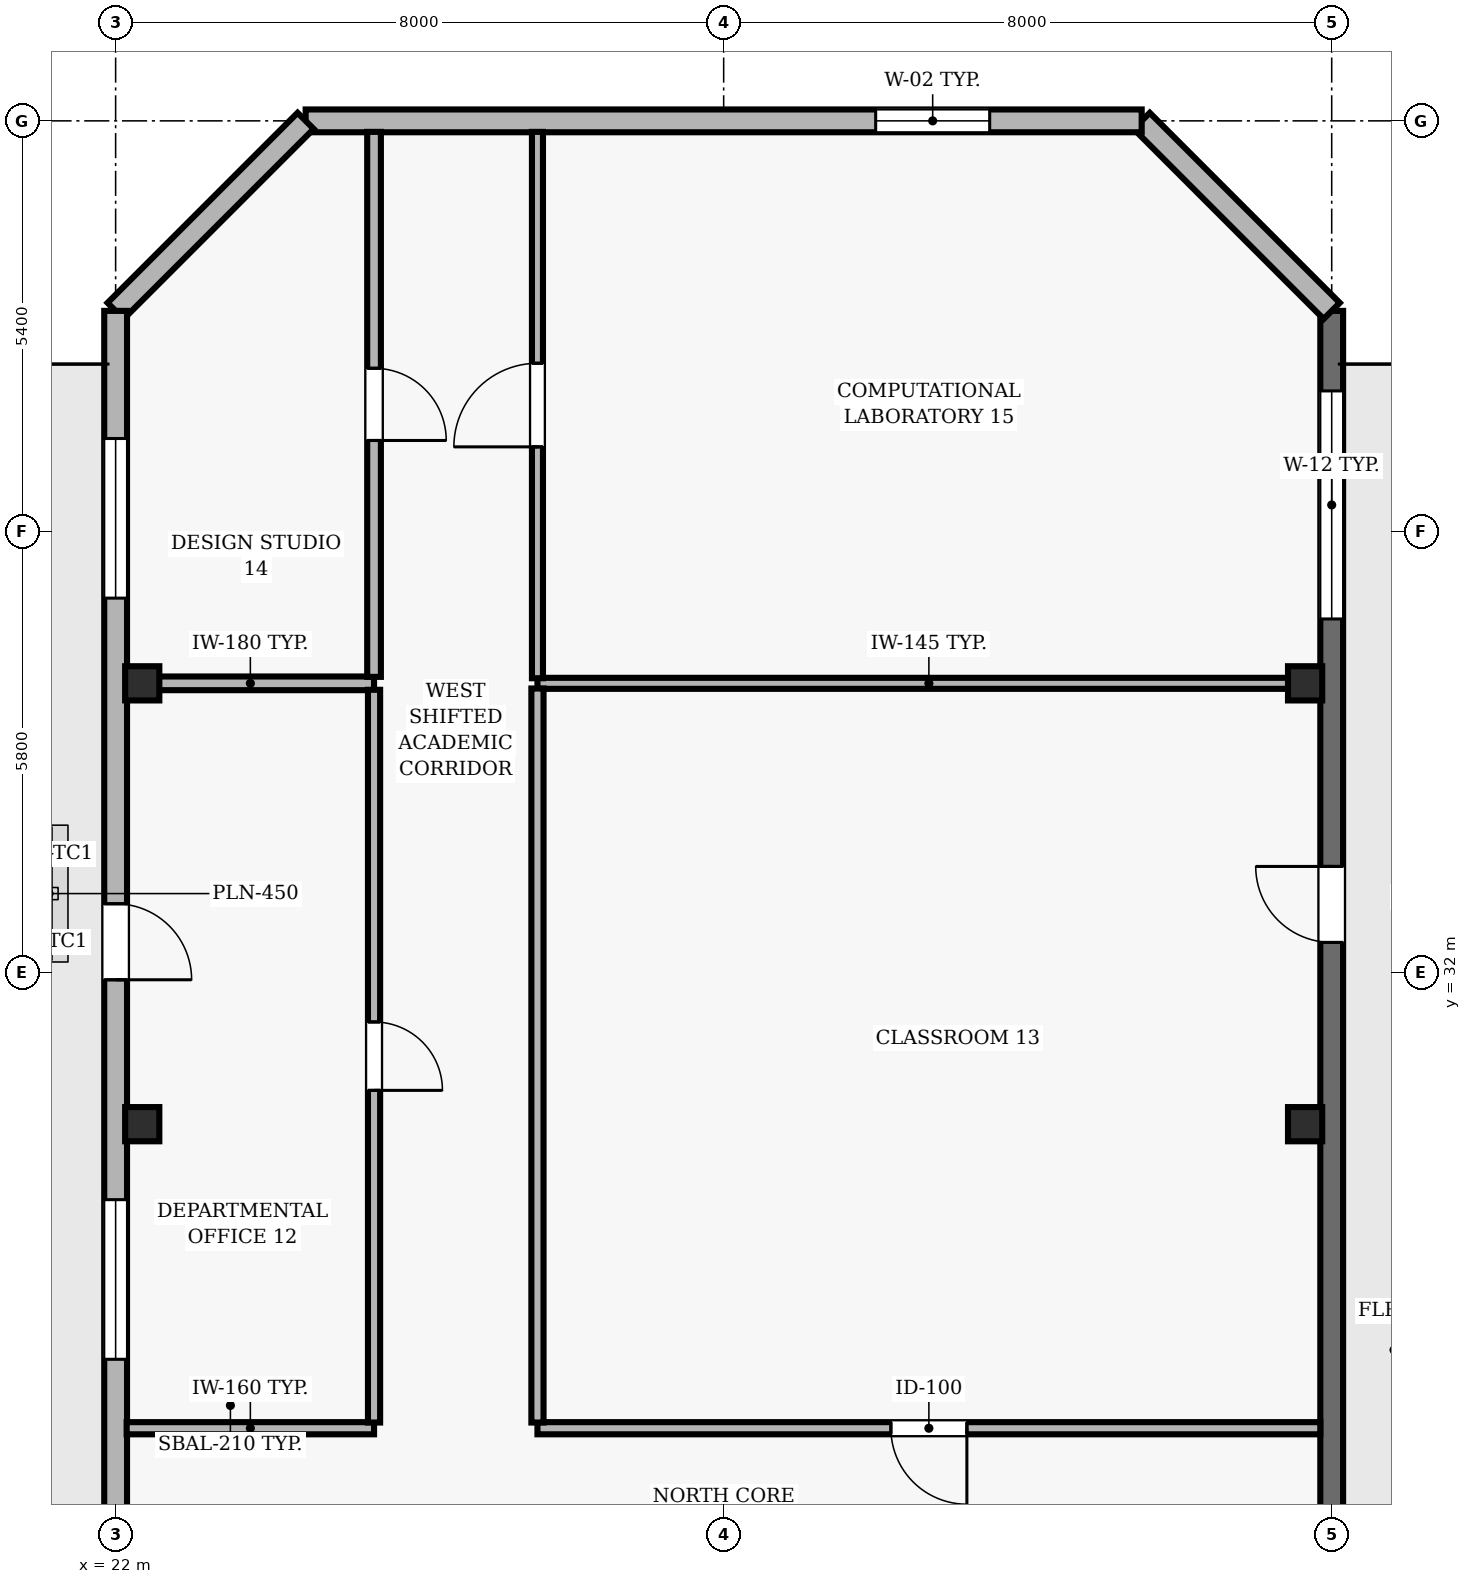
"""IFC4 building model, lengths in metres.
Left out: names, types, materials, properties, quantities, classifications, styles, units other than length and angle.
Written with IfcOpenShell. Run it as: python <this file> out.ifc"""

import sys

from ifc_helpers import new_model, si_unit, direction, frame, frame_2d, origin, origin_2d, place, context, subcontext, project, spatial, rectangle, hollow_rectangle, extrude, element, fill, save


model = new_model("IFC4")
c1 = context("Model", 3, precision=1e-05, world=origin(), true_north=direction((0.0, 1.0)))
c2 = subcontext(c1, "Body", "Model", "MODEL_VIEW")
j1 = project(units=[si_unit("LENGTHUNIT", "METRE"), si_unit("PLANEANGLEUNIT", "RADIAN")], contexts=[c1])
p1 = place(None, origin())
s1 = spatial("IfcSite", under=j1, at=p1, CompositionType="ELEMENT")
p2 = place(p1, origin())
s2 = spatial("IfcBuilding", under=s1, at=p2, CompositionType="ELEMENT")
p3 = place(p2, frame((0.0, 0.0, 210.9)))
s3 = spatial("IfcBuildingStorey", under=s2, at=p3, CompositionType="ELEMENT", Elevation=210.9)
for number, where, z_axis, x_axis in (
    (1, (22.35, 30.0, 0.0), (0.0, 0.0, 1.0), (1.0, 0.0, 0.0)),
    (2, (37.65, 30.0, 0.0), (0.0, 0.0, 1.0), (1.0, 0.0, 0.0)),
    (3, (22.35, 35.8, 0.0), (0.0, 0.0, 1.0), (1.0, 0.0, 0.0)),
    (4, (37.65, 35.8, 0.0), (0.0, 0.0, 1.0), (1.0, 0.0, 0.0)),
):
    element("IfcColumn", number, at=place(p3, frame(where, z_axis=z_axis, x_axis=x_axis)), inside=s3, PredefinedType="COLUMN", context=c2, shape_type="SweptSolid", body=[
        extrude(hollow_rectangle(XDim=0.45, YDim=0.45, WallThickness=0.02, at=origin_2d()), origin(), (0.0, 0.0, 1.0), 3.9),
    ])
p4 = place(p3, frame((38.0, 22.683, 0.0), z_axis=(0.0, 0.0, 1.0), x_axis=(0.0, 1.0, 0.0)))
e5 = element("IfcWall", 5, at=p4, inside=s3, PredefinedType="SOLIDWALL", context=c2, shape_type="SweptSolid", body=[
    extrude(rectangle(XDim=18.017, YDim=0.3, at=frame_2d((9.008, 0.0))), origin(), (0.0, 0.0, 1.0), 3.69),
])
p5 = place(p4, frame((9.708, 0.0, 0.0)))
e6 = element("IfcOpeningElement", 6, at=p5, cuts=e5, PredefinedType="OPENING", context=c2, shape_type="SweptSolid", body=[
    extrude(rectangle(XDim=1.0, YDim=2.2, at=frame_2d((0.5, 1.1))), frame((0.0, 0.16, 0.0), z_axis=(0.0, -1.0, 0.0), x_axis=(1.0, 0.0, 0.0)), (0.0, 0.0, 1.0), 0.32),
])
p6 = place(p4, frame((13.964, 0.0, 0.9)))
e7 = element("IfcOpeningElement", 7, at=p6, cuts=e5, PredefinedType="OPENING", context=c2, shape_type="SweptSolid", body=[
    extrude(rectangle(XDim=3.0, YDim=2.2, at=frame_2d((1.5, 1.1))), frame((0.0, 0.16, 0.0), z_axis=(0.0, -1.0, 0.0), x_axis=(1.0, 0.0, 0.0)), (0.0, 0.0, 1.0), 0.32),
])
p7 = place(p3, frame((38.0, 40.7, 0.0), z_axis=(0.0, 0.0, 1.0), x_axis=(-0.707106781187, 0.707106781187, 0.0)))
e8 = element("IfcWall", 8, at=p7, inside=s3, PredefinedType="SOLIDWALL", context=c2, shape_type="SweptSolid", body=[
    extrude(rectangle(XDim=3.536, YDim=0.3, at=frame_2d((1.768, 0.0))), origin(), (0.0, 0.0, 1.0), 3.69),
])
p8 = place(p3, frame((35.5, 43.2, 0.0), z_axis=(0.0, 0.0, 1.0), x_axis=(-1.0, 0.0, 0.0)))
e9 = element("IfcWall", 9, at=p8, inside=s3, PredefinedType="SOLIDWALL", context=c2, shape_type="SweptSolid", body=[
    extrude(rectangle(XDim=11.0, YDim=0.3, at=frame_2d((5.5, 0.0))), origin(), (0.0, 0.0, 1.0), 3.69),
])
p9 = place(p8, frame((2.0, 0.0, 0.9)))
e10 = element("IfcOpeningElement", 10, at=p9, cuts=e9, PredefinedType="OPENING", context=c2, shape_type="SweptSolid", body=[
    extrude(rectangle(XDim=1.5, YDim=1.6, at=frame_2d((0.75, 0.8))), frame((0.0, 0.16, 0.0), z_axis=(0.0, -1.0, 0.0), x_axis=(1.0, 0.0, 0.0)), (0.0, 0.0, 1.0), 0.32),
])
p10 = place(p3, frame((24.5, 43.2, 0.0), z_axis=(0.0, 0.0, 1.0), x_axis=(-0.707106781187, -0.707106781187, 0.0)))
e11 = element("IfcWall", 11, at=p10, inside=s3, PredefinedType="SOLIDWALL", context=c2, shape_type="SweptSolid", body=[
    extrude(rectangle(XDim=3.536, YDim=0.3, at=frame_2d((1.768, 0.0))), origin(), (0.0, 0.0, 1.0), 3.69),
])
p11 = place(p3, frame((22.0, 40.7, 0.0), z_axis=(0.0, 0.0, 1.0), x_axis=(0.0, -1.0, 0.0)))
e12 = element("IfcWall", 12, at=p11, inside=s3, PredefinedType="SOLIDWALL", context=c2, shape_type="SweptSolid", body=[
    extrude(rectangle(XDim=38.2, YDim=0.3, at=frame_2d((19.1, 0.0))), origin(), (0.0, 0.0, 1.0), 3.69),
])
p12 = place(p11, frame((7.8, 0.0, 0.0)))
e13 = element("IfcOpeningElement", 13, at=p12, cuts=e12, PredefinedType="OPENING", context=c2, shape_type="SweptSolid", body=[
    extrude(rectangle(XDim=1.0, YDim=2.2, at=frame_2d((0.5, 1.1))), frame((0.0, 0.16, 0.0), z_axis=(0.0, -1.0, 0.0), x_axis=(1.0, 0.0, 0.0)), (0.0, 0.0, 1.0), 0.32),
])
p13 = place(p11, frame((1.679, 0.0, 0.9)))
e14 = element("IfcOpeningElement", 14, at=p13, cuts=e12, PredefinedType="OPENING", context=c2, shape_type="SweptSolid", body=[
    extrude(rectangle(XDim=2.1, YDim=1.6, at=frame_2d((1.05, 0.8))), frame((0.0, 0.16, 0.0), z_axis=(0.0, -1.0, 0.0), x_axis=(1.0, 0.0, 0.0)), (0.0, 0.0, 1.0), 0.32),
])
p14 = place(p11, frame((11.693, 0.0, 0.9)))
e15 = element("IfcOpeningElement", 15, at=p14, cuts=e12, PredefinedType="OPENING", context=c2, shape_type="SweptSolid", body=[
    extrude(rectangle(XDim=2.1, YDim=1.6, at=frame_2d((1.05, 0.8))), frame((0.0, 0.16, 0.0), z_axis=(0.0, -1.0, 0.0), x_axis=(1.0, 0.0, 0.0)), (0.0, 0.0, 1.0), 0.32),
])
p15 = place(p11, frame((18.05, 0.0, 0.9)))
e16 = element("IfcOpeningElement", 16, at=p15, cuts=e12, PredefinedType="OPENING", context=c2, shape_type="SweptSolid", body=[
    extrude(rectangle(XDim=2.1, YDim=1.6, at=frame_2d((1.05, 0.8))), frame((0.0, 0.16, 0.0), z_axis=(0.0, -1.0, 0.0), x_axis=(1.0, 0.0, 0.0)), (0.0, 0.0, 1.0), 0.32),
])
p16 = place(p11, frame((23.057, 0.0, 0.9)))
e17 = element("IfcOpeningElement", 17, at=p16, cuts=e12, PredefinedType="OPENING", context=c2, shape_type="SweptSolid", body=[
    extrude(rectangle(XDim=2.1, YDim=1.6, at=frame_2d((1.05, 0.8))), frame((0.0, 0.16, 0.0), z_axis=(0.0, -1.0, 0.0), x_axis=(1.0, 0.0, 0.0)), (0.0, 0.0, 1.0), 0.32),
])
p17 = place(p11, frame((28.964, 0.0, 0.9)))
e18 = element("IfcOpeningElement", 18, at=p17, cuts=e12, PredefinedType="OPENING", context=c2, shape_type="SweptSolid", body=[
    extrude(rectangle(XDim=2.1, YDim=1.6, at=frame_2d((1.05, 0.8))), frame((0.0, 0.16, 0.0), z_axis=(0.0, -1.0, 0.0), x_axis=(1.0, 0.0, 0.0)), (0.0, 0.0, 1.0), 0.32),
])
p18 = place(p3, frame((25.4, 26.0, 0.0), z_axis=(0.0, 0.0, 1.0), x_axis=(-1.0, 0.0, 0.0)))
e19 = element("IfcWall", 19, at=p18, inside=s3, PredefinedType="PARTITIONING", context=c2, shape_type="SweptSolid", body=[
    extrude(rectangle(XDim=3.255, YDim=0.16, at=frame_2d((1.627, 0.0))), origin(), (0.0, 0.0, 1.0), 3.69),
])
p19 = place(p3, frame((25.4, 35.8, 0.0), z_axis=(0.0, 0.0, 1.0), x_axis=(-1.0, 0.0, 0.0)))
e20 = element("IfcWall", 20, at=p19, inside=s3, PredefinedType="PARTITIONING", context=c2, shape_type="SweptSolid", body=[
    extrude(rectangle(XDim=3.255, YDim=0.18, at=frame_2d((1.627, 0.0))), origin(), (0.0, 0.0, 1.0), 3.146),
])
p20 = place(p3, frame((37.85, 26.0, 0.0), z_axis=(0.0, 0.0, 1.0), x_axis=(-1.0, 0.0, 0.0)))
e21 = element("IfcWall", 21, at=p20, inside=s3, PredefinedType="PARTITIONING", context=c2, shape_type="SweptSolid", body=[
    extrude(rectangle(XDim=10.3, YDim=0.16, at=frame_2d((5.15, 0.0))), origin(), (0.0, 0.0, 1.0), 3.69),
])
p21 = place(p20, frame((4.65, 0.0, 0.0)))
e22 = element("IfcOpeningElement", 22, at=p21, cuts=e21, PredefinedType="OPENING", context=c2, shape_type="SweptSolid", body=[
    extrude(rectangle(XDim=1.0, YDim=2.1, at=frame_2d((0.5, 1.05))), frame((0.0, 0.09, 0.0), z_axis=(0.0, -1.0, 0.0), x_axis=(1.0, 0.0, 0.0)), (0.0, 0.0, 1.0), 0.18),
])
p22 = place(p3, frame((37.85, 35.8, 0.0), z_axis=(0.0, 0.0, 1.0), x_axis=(-1.0, 0.0, 0.0)))
e23 = element("IfcWall", 23, at=p22, inside=s3, PredefinedType="PARTITIONING", context=c2, shape_type="SweptSolid", body=[
    extrude(rectangle(XDim=10.3, YDim=0.145, at=frame_2d((5.15, 0.0))), origin(), (0.0, 0.0, 1.0), 3.146),
])
p23 = place(p3, frame((25.4, 35.715, 0.0), z_axis=(0.0, 0.0, 1.0), x_axis=(0.0, -1.0, 0.0)))
e24 = element("IfcWall", 24, at=p23, inside=s3, PredefinedType="PARTITIONING", context=c2, shape_type="SweptSolid", body=[
    extrude(rectangle(XDim=9.64, YDim=0.16, at=frame_2d((4.82, 0.0))), origin(), (0.0, 0.0, 1.0), 3.69),
])
p24 = place(p23, frame((4.37, 0.0, 0.0)))
e25 = element("IfcOpeningElement", 25, at=p24, cuts=e24, PredefinedType="OPENING", context=c2, shape_type="SweptSolid", body=[
    extrude(rectangle(XDim=0.9, YDim=2.1, at=frame_2d((0.45, 1.05))), frame((0.0, 0.09, 0.0), z_axis=(0.0, -1.0, 0.0), x_axis=(1.0, 0.0, 0.0)), (0.0, 0.0, 1.0), 0.18),
])
p25 = place(p3, frame((25.4, 43.055, 0.0), z_axis=(0.0, 0.0, 1.0), x_axis=(0.0, -1.0, 0.0)))
e26 = element("IfcWall", 26, at=p25, inside=s3, PredefinedType="PARTITIONING", context=c2, shape_type="SweptSolid", body=[
    extrude(rectangle(XDim=7.17, YDim=0.18, at=frame_2d((3.585, 0.0))), origin(), (0.0, 0.0, 1.0), 3.69),
])
p26 = place(p25, frame((3.11, 0.0, 0.0)))
e27 = element("IfcOpeningElement", 27, at=p26, cuts=e26, PredefinedType="OPENING", context=c2, shape_type="SweptSolid", body=[
    extrude(rectangle(XDim=0.95, YDim=2.1, at=frame_2d((0.475, 1.05))), frame((0.0, 0.1, 0.0), z_axis=(0.0, -1.0, 0.0), x_axis=(1.0, 0.0, 0.0)), (0.0, 0.0, 1.0), 0.2),
])
p27 = place(p3, frame((27.55, 26.075, 0.0), z_axis=(0.0, 0.0, 1.0), x_axis=(0.0, 1.0, 0.0)))
e28 = element("IfcWall", 28, at=p27, inside=s3, PredefinedType="PARTITIONING", context=c2, shape_type="SweptSolid", body=[
    extrude(rectangle(XDim=9.657, YDim=0.16, at=frame_2d((4.829, 0.0))), origin(), (0.0, 0.0, 1.0), 3.69),
])
p28 = place(p3, frame((27.55, 35.867, 0.0), z_axis=(0.0, 0.0, 1.0), x_axis=(0.0, 1.0, 0.0)))
e29 = element("IfcWall", 29, at=p28, inside=s3, PredefinedType="PARTITIONING", context=c2, shape_type="SweptSolid", body=[
    extrude(rectangle(XDim=7.188, YDim=0.145, at=frame_2d((3.594, 0.0))), origin(), (0.0, 0.0, 1.0), 3.69),
])
p29 = place(p28, frame((3.044, 0.0, 0.0)))
e30 = element("IfcOpeningElement", 30, at=p29, cuts=e29, PredefinedType="OPENING", context=c2, shape_type="SweptSolid", body=[
    extrude(rectangle(XDim=1.1, YDim=2.15, at=frame_2d((0.55, 1.075))), frame((0.0, 0.083, 0.0), z_axis=(0.0, -1.0, 0.0), x_axis=(1.0, 0.0, 0.0)), (0.0, 0.0, 1.0), 0.165),
])
p30 = place(p5, origin())
e31 = element("IfcDoor", 31, at=p30, inside=s3, OperationType="SINGLE_SWING_RIGHT", PredefinedType="DOOR", context=c2, shape_type="SweptSolid", body=[
    extrude(rectangle(XDim=1.0, YDim=2.2, at=frame_2d((0.5, 1.1))), frame((0.0, 0.025, 0.0), z_axis=(0.0, -1.0, 0.0), x_axis=(1.0, 0.0, 0.0)), (0.0, 0.0, 1.0), 0.05),
])
fill(e6, e31)
p31 = place(p6, origin())
e32 = element("IfcWindow", 32, at=p31, inside=s3, PartitioningType="SINGLE_PANEL", PredefinedType="WINDOW", context=c2, shape_type="SweptSolid", body=[
    extrude(rectangle(XDim=3.0, YDim=2.2, at=frame_2d((1.5, 1.1))), frame((0.0, 0.03, 0.0), z_axis=(0.0, -1.0, 0.0), x_axis=(1.0, 0.0, 0.0)), (0.0, 0.0, 1.0), 0.06),
])
fill(e7, e32)
p32 = place(p9, origin())
e33 = element("IfcWindow", 33, at=p32, inside=s3, PartitioningType="SINGLE_PANEL", PredefinedType="WINDOW", context=c2, shape_type="SweptSolid", body=[
    extrude(rectangle(XDim=1.5, YDim=1.6, at=frame_2d((0.75, 0.8))), frame((0.0, 0.03, 0.0), z_axis=(0.0, -1.0, 0.0), x_axis=(1.0, 0.0, 0.0)), (0.0, 0.0, 1.0), 0.06),
])
fill(e10, e33)
p33 = place(p12, origin())
e34 = element("IfcDoor", 34, at=p33, inside=s3, OperationType="SINGLE_SWING_RIGHT", PredefinedType="DOOR", context=c2, shape_type="SweptSolid", body=[
    extrude(rectangle(XDim=1.0, YDim=2.2, at=frame_2d((0.5, 1.1))), frame((0.0, 0.025, 0.0), z_axis=(0.0, -1.0, 0.0), x_axis=(1.0, 0.0, 0.0)), (0.0, 0.0, 1.0), 0.05),
])
fill(e13, e34)
p34 = place(p13, origin())
e35 = element("IfcWindow", 35, at=p34, inside=s3, PartitioningType="SINGLE_PANEL", PredefinedType="WINDOW", context=c2, shape_type="SweptSolid", body=[
    extrude(rectangle(XDim=2.1, YDim=1.6, at=frame_2d((1.05, 0.8))), frame((0.0, 0.03, 0.0), z_axis=(0.0, -1.0, 0.0), x_axis=(1.0, 0.0, 0.0)), (0.0, 0.0, 1.0), 0.06),
])
fill(e14, e35)
p35 = place(p14, origin())
e36 = element("IfcWindow", 36, at=p35, inside=s3, PartitioningType="SINGLE_PANEL", PredefinedType="WINDOW", context=c2, shape_type="SweptSolid", body=[
    extrude(rectangle(XDim=2.1, YDim=1.6, at=frame_2d((1.05, 0.8))), frame((0.0, 0.03, 0.0), z_axis=(0.0, -1.0, 0.0), x_axis=(1.0, 0.0, 0.0)), (0.0, 0.0, 1.0), 0.06),
])
fill(e15, e36)
p36 = place(p24, origin())
e37 = element("IfcDoor", 37, at=p36, inside=s3, OperationType="SINGLE_SWING_RIGHT", PredefinedType="DOOR", context=c2, shape_type="SweptSolid", body=[
    extrude(rectangle(XDim=0.9, YDim=2.1, at=frame_2d((0.45, 1.05))), frame((0.0, 0.025, 0.0), z_axis=(0.0, -1.0, 0.0), x_axis=(1.0, 0.0, 0.0)), (0.0, 0.0, 1.0), 0.05),
])
fill(e25, e37)
p37 = place(p21, origin())
e38 = element("IfcDoor", 38, at=p37, inside=s3, OperationType="SINGLE_SWING_LEFT", PredefinedType="DOOR", context=c2, shape_type="SweptSolid", body=[
    extrude(rectangle(XDim=1.0, YDim=2.1, at=frame_2d((0.5, 1.05))), frame((0.0, 0.025, 0.0), z_axis=(0.0, -1.0, 0.0), x_axis=(1.0, 0.0, 0.0)), (0.0, 0.0, 1.0), 0.05),
])
fill(e22, e38)
p38 = place(p26, origin())
e39 = element("IfcDoor", 39, at=p38, inside=s3, OperationType="SINGLE_SWING_RIGHT", PredefinedType="DOOR", context=c2, shape_type="SweptSolid", body=[
    extrude(rectangle(XDim=0.95, YDim=2.1, at=frame_2d((0.475, 1.05))), frame((0.0, 0.025, 0.0), z_axis=(0.0, -1.0, 0.0), x_axis=(1.0, 0.0, 0.0)), (0.0, 0.0, 1.0), 0.05),
])
fill(e27, e39)
p39 = place(p29, origin())
e40 = element("IfcDoor", 40, at=p39, inside=s3, OperationType="SINGLE_SWING_LEFT", PredefinedType="DOOR", context=c2, shape_type="SweptSolid", body=[
    extrude(rectangle(XDim=1.1, YDim=2.15, at=frame_2d((0.55, 1.075))), frame((0.0, 0.025, 0.0), z_axis=(0.0, -1.0, 0.0), x_axis=(1.0, 0.0, 0.0)), (0.0, 0.0, 1.0), 0.05),
])
fill(e30, e40)
save(model, sys.argv[1])
